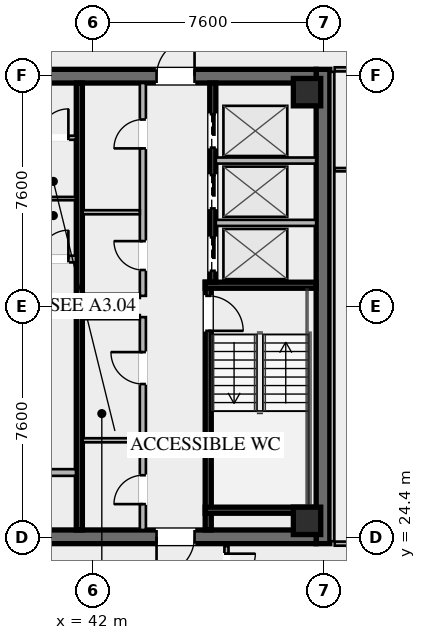
"""IFC4 building model, lengths in metres.
Left out: names, types, materials, properties, quantities, classifications, styles, units other than length and angle.
Written with IfcOpenShell. Run it as: python <this file> out.ifc"""

import sys

from ifc_helpers import new_model, si_unit, direction, frame, frame_2d, origin, origin_2d, place, context, subcontext, project, spatial, rectangle, hollow_rectangle, extrude, element, fill, save


model = new_model("IFC4")
c1 = context("Model", 3, precision=1e-05, world=origin(), true_north=direction((0.0, 1.0)))
c2 = subcontext(c1, "Body", "Model", "MODEL_VIEW")
j1 = project(units=[si_unit("LENGTHUNIT", "METRE"), si_unit("PLANEANGLEUNIT", "RADIAN")], contexts=[c1])
p1 = place(None, origin())
s1 = spatial("IfcSite", under=j1, at=p1, CompositionType="ELEMENT")
p2 = place(p1, origin())
s2 = spatial("IfcBuilding", under=s1, at=p2, CompositionType="ELEMENT")
p3 = place(p2, frame((0.0, 0.0, 232.6)))
s3 = spatial("IfcBuildingStorey", under=s2, at=p3, CompositionType="ELEMENT", Elevation=232.6)
p4 = place(p3, frame((49.575, 39.8, 0.0), z_axis=(0.0, 0.0, 1.0), x_axis=(0.0, -1.0, 0.0)))
e1 = element("IfcWall", 1, at=p4, inside=s3, PredefinedType="SHEAR", context=c2, shape_type="SweptSolid", body=[
    extrude(rectangle(XDim=15.6, YDim=0.45, at=frame_2d((7.8, 0.0))), origin(), (0.0, 0.0, 1.0), 3.55),
])
p5 = place(p3, frame((49.35, 24.425, 0.0), z_axis=(0.0, 0.0, 1.0), x_axis=(-1.0, 0.0, 0.0)))
e2 = element("IfcWall", 2, at=p5, inside=s3, PredefinedType="SHEAR", context=c2, shape_type="SweptSolid", body=[
    extrude(rectangle(XDim=14.7, YDim=0.45, at=frame_2d((7.35, 0.0))), origin(), (0.0, 0.0, 1.0), 3.55),
])
p6 = place(p5, frame((9.05, 0.0, 0.0)))
e3 = element("IfcOpeningElement", 3, at=p6, cuts=e2, PredefinedType="OPENING", context=c2, shape_type="SweptSolid", body=[
    extrude(rectangle(XDim=1.25, YDim=2.25, at=frame_2d((0.625, 1.125))), frame((0.0, 0.235, 0.0), z_axis=(0.0, -1.0, 0.0), x_axis=(1.0, 0.0, 0.0)), (0.0, 0.0, 1.0), 0.47),
])
p7 = place(p5, frame((4.0, 0.0, 0.0)))
e4 = element("IfcOpeningElement", 4, at=p7, cuts=e2, PredefinedType="OPENING", context=c2, shape_type="SweptSolid", body=[
    extrude(rectangle(XDim=1.25, YDim=2.25, at=frame_2d((0.625, 1.125))), frame((0.0, 0.235, 0.0), z_axis=(0.0, -1.0, 0.0), x_axis=(1.0, 0.0, 0.0)), (0.0, 0.0, 1.0), 0.47),
])
p8 = place(p3, frame((34.65, 39.575, 0.0), z_axis=(0.0, 0.0, 1.0), x_axis=(1.0, 0.0, 0.0)))
e5 = element("IfcWall", 5, at=p8, inside=s3, PredefinedType="SHEAR", context=c2, shape_type="SweptSolid", body=[
    extrude(rectangle(XDim=14.7, YDim=0.45, at=frame_2d((7.35, 0.0))), origin(), (0.0, 0.0, 1.0), 3.55),
])
p9 = place(p8, frame((4.4, 0.0, 0.0)))
e6 = element("IfcOpeningElement", 6, at=p9, cuts=e5, PredefinedType="OPENING", context=c2, shape_type="SweptSolid", body=[
    extrude(rectangle(XDim=1.25, YDim=2.25, at=frame_2d((0.625, 1.125))), frame((0.0, 0.235, 0.0), z_axis=(0.0, -1.0, 0.0), x_axis=(1.0, 0.0, 0.0)), (0.0, 0.0, 1.0), 0.47),
])
p10 = place(p8, frame((9.45, 0.0, 0.0)))
e7 = element("IfcOpeningElement", 7, at=p10, cuts=e5, PredefinedType="OPENING", context=c2, shape_type="SweptSolid", body=[
    extrude(rectangle(XDim=1.25, YDim=2.25, at=frame_2d((0.625, 1.125))), frame((0.0, 0.235, 0.0), z_axis=(0.0, -1.0, 0.0), x_axis=(1.0, 0.0, 0.0)), (0.0, 0.0, 1.0), 0.47),
])
for number, where, z_axis, x_axis in (
    (8, (49.05, 24.95, 0.0), (0.0, 0.0, 1.0), (1.0, 0.0, 0.0)),
    (9, (49.05, 39.05, 0.0), (0.0, 0.0, 1.0), (1.0, 0.0, 0.0)),
):
    element("IfcColumn", number, at=place(p3, frame(where, z_axis=z_axis, x_axis=x_axis)), inside=s3, PredefinedType="COLUMN", context=c2, shape_type="SweptSolid", body=[
        extrude(hollow_rectangle(XDim=0.9, YDim=0.9, WallThickness=0.04, at=origin_2d()), origin(), (0.0, 0.0, 1.0), 3.37),
    ])
p11 = place(p3, frame((45.8, 32.8, 0.0), z_axis=(0.0, 0.0, 1.0), x_axis=(0.0, -1.0, 0.0)))
e10 = element("IfcWall", 10, at=p11, inside=s3, PredefinedType="SHEAR", context=c2, shape_type="SweptSolid", body=[
    extrude(rectangle(XDim=8.15, YDim=0.2, at=frame_2d((4.075, 0.0))), origin(), (0.0, 0.0, 1.0), 3.37),
])
p12 = place(p11, frame((0.45, 0.0, 0.0)))
e11 = element("IfcOpeningElement", 11, at=p12, cuts=e10, PredefinedType="OPENING", context=c2, shape_type="SweptSolid", body=[
    extrude(rectangle(XDim=1.15, YDim=2.2, at=frame_2d((0.575, 1.1))), frame((0.0, 0.11, 0.0), z_axis=(0.0, -1.0, 0.0), x_axis=(1.0, 0.0, 0.0)), (0.0, 0.0, 1.0), 0.22),
])
for number, where, z_axis, x_axis in (
    (12, (45.7, 32.7, 0.0), (0.0, 0.0, 1.0), (1.0, 0.0, 0.0)),
    (13, (45.7, 25.3, 0.0), (0.0, 0.0, 1.0), (1.0, 0.0, 0.0)),
):
    element("IfcWall", number, at=place(p3, frame(where, z_axis=z_axis, x_axis=x_axis)), inside=s3, PredefinedType="SHEAR", context=c2, shape_type="SweptSolid", body=[
        extrude(rectangle(XDim=3.65, YDim=0.2, at=frame_2d((1.825, 0.0))), origin(), (0.0, 0.0, 1.0), 3.37),
    ])
p13 = place(p3, frame((41.56, 24.65, 0.0), z_axis=(0.0, 0.0, 1.0), x_axis=(0.0, 1.0, 0.0)))
e14 = element("IfcWall", 14, at=p13, inside=s3, PredefinedType="SHEAR", context=c2, shape_type="SweptSolid", body=[
    extrude(rectangle(XDim=14.7, YDim=0.2, at=frame_2d((7.35, 0.0))), origin(), (0.0, 0.0, 1.0), 3.37),
])
p14 = place(p3, frame((38.3, 33.56, 0.0), z_axis=(0.0, 0.0, 1.0), x_axis=(1.0, 0.0, 0.0)))
e15 = element("IfcWall", 15, at=p14, inside=s3, PredefinedType="SOLIDWALL", context=c2, shape_type="SweptSolid", body=[
    extrude(rectangle(XDim=3.15, YDim=0.22, at=frame_2d((1.575, 0.0))), origin(), (0.0, 0.0, 1.0), 2.723),
])
p15 = place(p14, frame((0.25, 0.0, 0.0)))
e16 = element("IfcOpeningElement", 16, at=p15, cuts=e15, PredefinedType="OPENING", context=c2, shape_type="SweptSolid", body=[
    extrude(rectangle(XDim=0.95, YDim=2.05, at=frame_2d((0.475, 1.025))), frame((0.0, 0.12, 0.0), z_axis=(0.0, -1.0, 0.0), x_axis=(1.0, 0.0, 0.0)), (0.0, 0.0, 1.0), 0.24),
])
p16 = place(p14, frame((1.95, 0.0, 0.0)))
e17 = element("IfcOpeningElement", 17, at=p16, cuts=e15, PredefinedType="OPENING", context=c2, shape_type="SweptSolid", body=[
    extrude(rectangle(XDim=0.95, YDim=2.05, at=frame_2d((0.475, 1.025))), frame((0.0, 0.12, 0.0), z_axis=(0.0, -1.0, 0.0), x_axis=(1.0, 0.0, 0.0)), (0.0, 0.0, 1.0), 0.24),
])
p17 = place(p3, frame((38.3, 26.54, 0.0), z_axis=(0.0, 0.0, 1.0), x_axis=(1.0, 0.0, 0.0)))
e18 = element("IfcWall", 18, at=p17, inside=s3, PredefinedType="SOLIDWALL", context=c2, shape_type="SweptSolid", body=[
    extrude(rectangle(XDim=3.15, YDim=0.22, at=frame_2d((1.575, 0.0))), origin(), (0.0, 0.0, 1.0), 2.723),
])
p18 = place(p17, frame((0.95, 0.0, 0.0)))
e19 = element("IfcOpeningElement", 19, at=p18, cuts=e18, PredefinedType="OPENING", context=c2, shape_type="SweptSolid", body=[
    extrude(rectangle(XDim=1.25, YDim=2.25, at=frame_2d((0.625, 1.125))), frame((0.0, 0.12, 0.0), z_axis=(0.0, -1.0, 0.0), x_axis=(1.0, 0.0, 0.0)), (0.0, 0.0, 1.0), 0.24),
])
p19 = place(p3, frame((45.95, 39.35, 0.0), z_axis=(0.0, 0.0, 1.0), x_axis=(0.0, -1.0, 0.0)))
e20 = element("IfcWall", 20, at=p19, inside=s3, PredefinedType="SHEAR", context=c2, shape_type="SweptSolid", body=[
    extrude(rectangle(XDim=6.55, YDim=0.2, at=frame_2d((3.275, 0.0))), origin(), (0.0, 0.0, 1.0), 3.37),
])
p20 = place(p19, frame((5.075, 0.0, 0.0)))
e21 = element("IfcOpeningElement", 21, at=p20, cuts=e20, PredefinedType="OPENING", context=c2, shape_type="SweptSolid", body=[
    extrude(rectangle(XDim=1.1, YDim=2.2, at=frame_2d((0.55, 1.1))), frame((0.0, 0.11, 0.0), z_axis=(0.0, -1.0, 0.0), x_axis=(1.0, 0.0, 0.0)), (0.0, 0.0, 1.0), 0.22),
])
p21 = place(p19, frame((3.025, 0.0, 0.0)))
e22 = element("IfcOpeningElement", 22, at=p21, cuts=e20, PredefinedType="OPENING", context=c2, shape_type="SweptSolid", body=[
    extrude(rectangle(XDim=1.1, YDim=2.2, at=frame_2d((0.55, 1.1))), frame((0.0, 0.11, 0.0), z_axis=(0.0, -1.0, 0.0), x_axis=(1.0, 0.0, 0.0)), (0.0, 0.0, 1.0), 0.22),
])
p22 = place(p19, frame((1.025, 0.0, 0.0)))
e23 = element("IfcOpeningElement", 23, at=p22, cuts=e20, PredefinedType="OPENING", context=c2, shape_type="SweptSolid", body=[
    extrude(rectangle(XDim=1.1, YDim=2.2, at=frame_2d((0.55, 1.1))), frame((0.0, 0.11, 0.0), z_axis=(0.0, -1.0, 0.0), x_axis=(1.0, 0.0, 0.0)), (0.0, 0.0, 1.0), 0.22),
])
for number, where, z_axis, x_axis in (
    (24, (46.05, 34.75, 0.0), (0.0, 0.0, 1.0), (1.0, 0.0, 0.0)),
    (25, (46.05, 36.8, 0.0), (0.0, 0.0, 1.0), (1.0, 0.0, 0.0)),
):
    element("IfcWall", number, at=place(p3, frame(where, z_axis=z_axis, x_axis=x_axis)), inside=s3, PredefinedType="SOLIDWALL", context=c2, shape_type="SweptSolid", body=[
        extrude(rectangle(XDim=3.3, YDim=0.2, at=frame_2d((1.65, 0.0))), origin(), (0.0, 0.0, 1.0), 3.37),
    ])
p23 = place(p3, frame((38.3, 37.55, 0.0), z_axis=(0.0, 0.0, 1.0), x_axis=(1.0, 0.0, 0.0)))
e26 = element("IfcWall", 26, at=p23, inside=s3, PredefinedType="PARTITIONING", context=c2, shape_type="SweptSolid", body=[
    extrude(rectangle(XDim=3.15, YDim=0.135, at=frame_2d((1.575, 0.0))), origin(), (0.0, 0.0, 1.0), 2.723),
])
p24 = place(p23, frame((0.25, 0.0, 0.0)))
e27 = element("IfcOpeningElement", 27, at=p24, cuts=e26, PredefinedType="OPENING", context=c2, shape_type="SweptSolid", body=[
    extrude(rectangle(XDim=0.95, YDim=2.05, at=frame_2d((0.475, 1.025))), frame((0.0, 0.077, 0.0), z_axis=(0.0, -1.0, 0.0), x_axis=(1.0, 0.0, 0.0)), (0.0, 0.0, 1.0), 0.155),
])
p25 = place(p23, frame((1.95, 0.0, 0.0)))
e28 = element("IfcOpeningElement", 28, at=p25, cuts=e26, PredefinedType="OPENING", context=c2, shape_type="SweptSolid", body=[
    extrude(rectangle(XDim=0.95, YDim=2.05, at=frame_2d((0.475, 1.025))), frame((0.0, 0.077, 0.0), z_axis=(0.0, -1.0, 0.0), x_axis=(1.0, 0.0, 0.0)), (0.0, 0.0, 1.0), 0.155),
])
p26 = place(p3, frame((38.3, 35.55, 0.0), z_axis=(0.0, 0.0, 1.0), x_axis=(1.0, 0.0, 0.0)))
e29 = element("IfcWall", 29, at=p26, inside=s3, PredefinedType="PARTITIONING", context=c2, shape_type="SweptSolid", body=[
    extrude(rectangle(XDim=3.15, YDim=0.11, at=frame_2d((1.575, 0.0))), origin(), (0.0, 0.0, 1.0), 2.723),
])
p27 = place(p3, frame((43.65, 24.65, 0.0), z_axis=(0.0, 0.0, 1.0), x_axis=(0.0, 1.0, 0.0)))
e30 = element("IfcWall", 30, at=p27, inside=s3, PredefinedType="SOLIDWALL", context=c2, shape_type="SweptSolid", body=[
    extrude(rectangle(XDim=7.0, YDim=0.2, at=frame_2d((3.5, 0.0))), origin(), (0.0, 0.0, 1.0), 2.723),
])
p28 = place(p27, frame((0.85, 0.0, 0.0)))
e31 = element("IfcOpeningElement", 31, at=p28, cuts=e30, PredefinedType="OPENING", context=c2, shape_type="SweptSolid", body=[
    extrude(rectangle(XDim=0.95, YDim=2.05, at=frame_2d((0.475, 1.025))), frame((0.0, 0.11, 0.0), z_axis=(0.0, -1.0, 0.0), x_axis=(1.0, 0.0, 0.0)), (0.0, 0.0, 1.0), 0.22),
])
p29 = place(p27, frame((4.8, 0.0, 0.0)))
e32 = element("IfcOpeningElement", 32, at=p29, cuts=e30, PredefinedType="OPENING", context=c2, shape_type="SweptSolid", body=[
    extrude(rectangle(XDim=1.05, YDim=2.2, at=frame_2d((0.525, 1.1))), frame((0.0, 0.11, 0.0), z_axis=(0.0, -1.0, 0.0), x_axis=(1.0, 0.0, 0.0)), (0.0, 0.0, 1.0), 0.22),
])
for number, where, z_axis, x_axis in (
    (33, (41.67, 31.65, 0.0), (0.0, 0.0, 1.0), (1.0, 0.0, 0.0)),
    (34, (41.67, 27.6, 0.0), (0.0, 0.0, 1.0), (1.0, 0.0, 0.0)),
):
    element("IfcWall", number, at=place(p3, frame(where, z_axis=z_axis, x_axis=x_axis)), inside=s3, PredefinedType="PARTITIONING", context=c2, shape_type="SweptSolid", body=[
        extrude(rectangle(XDim=1.88, YDim=0.135, at=frame_2d((0.94, 0.0))), origin(), (0.0, 0.0, 1.0), 2.723),
    ])
p30 = place(p3, frame((43.65, 32.35, 0.0), z_axis=(0.0, 0.0, 1.0), x_axis=(0.0, 1.0, 0.0)))
e35 = element("IfcWall", 35, at=p30, inside=s3, PredefinedType="SOLIDWALL", context=c2, shape_type="SweptSolid", body=[
    extrude(rectangle(XDim=7.0, YDim=0.2, at=frame_2d((3.5, 0.0))), origin(), (0.0, 0.0, 1.0), 2.723),
])
p31 = place(p30, frame((0.85, 0.0, 0.0)))
e36 = element("IfcOpeningElement", 36, at=p31, cuts=e35, PredefinedType="OPENING", context=c2, shape_type="SweptSolid", body=[
    extrude(rectangle(XDim=0.95, YDim=2.05, at=frame_2d((0.475, 1.025))), frame((0.0, 0.11, 0.0), z_axis=(0.0, -1.0, 0.0), x_axis=(1.0, 0.0, 0.0)), (0.0, 0.0, 1.0), 0.22),
])
p32 = place(p30, frame((4.85, 0.0, 0.0)))
e37 = element("IfcOpeningElement", 37, at=p32, cuts=e35, PredefinedType="OPENING", context=c2, shape_type="SweptSolid", body=[
    extrude(rectangle(XDim=0.95, YDim=2.05, at=frame_2d((0.475, 1.025))), frame((0.0, 0.11, 0.0), z_axis=(0.0, -1.0, 0.0), x_axis=(1.0, 0.0, 0.0)), (0.0, 0.0, 1.0), 0.22),
])
for number, where, z_axis, x_axis in (
    (38, (41.67, 32.35, 0.0), (0.0, 0.0, 1.0), (1.0, 0.0, 0.0)),
    (39, (41.67, 35.1, 0.0), (0.0, 0.0, 1.0), (1.0, 0.0, 0.0)),
):
    element("IfcWall", number, at=place(p3, frame(where, z_axis=z_axis, x_axis=x_axis)), inside=s3, PredefinedType="PARTITIONING", context=c2, shape_type="SweptSolid", body=[
        extrude(rectangle(XDim=1.88, YDim=0.135, at=frame_2d((0.94, 0.0))), origin(), (0.0, 0.0, 1.0), 2.723),
    ])
p33 = place(p3, frame((46.4, 24.12, 0.0), z_axis=(0.0, 0.0, 1.0), x_axis=(0.0, -1.0, 0.0)))
e40 = element("IfcWall", 40, at=p33, inside=s3, PredefinedType="PARTITIONING", context=c2, shape_type="SweptSolid", body=[
    extrude(rectangle(XDim=2.54, YDim=0.135, at=frame_2d((1.27, 0.0))), origin(), (0.0, 0.0, 1.0), 2.723),
])
p34 = place(p33, frame((0.25, 0.0, 0.0)))
e41 = element("IfcOpeningElement", 41, at=p34, cuts=e40, PredefinedType="OPENING", context=c2, shape_type="SweptSolid", body=[
    extrude(rectangle(XDim=0.95, YDim=2.05, at=frame_2d((0.475, 1.025))), frame((0.0, 0.077, 0.0), z_axis=(0.0, -1.0, 0.0), x_axis=(1.0, 0.0, 0.0)), (0.0, 0.0, 1.0), 0.155),
])
p35 = place(p3, frame((49.88, 39.72, 0.0), z_axis=(0.0, 0.0, 1.0), x_axis=(0.0, -1.0, 0.0)))
e42 = element("IfcWall", 42, at=p35, inside=s3, PredefinedType="PARTITIONING", context=c2, shape_type="SweptSolid", body=[
    extrude(rectangle(XDim=15.44, YDim=0.135, at=frame_2d((7.72, 0.0))), origin(), (0.0, 0.0, 1.0), 2.723),
])
p36 = place(p3, frame((57.53, 39.8, 0.0), z_axis=(0.0, 0.0, 1.0), x_axis=(-1.0, 0.0, 0.0)))
e43 = element("IfcWall", 43, at=p36, inside=s3, PredefinedType="PARTITIONING", context=c2, shape_type="SweptSolid", body=[
    extrude(rectangle(XDim=7.57, YDim=0.135, at=frame_2d((3.785, 0.0))), origin(), (0.0, 0.0, 1.0), 2.723),
])
p37 = place(p36, frame((6.13, 0.0, 0.0)))
e44 = element("IfcOpeningElement", 44, at=p37, cuts=e43, PredefinedType="OPENING", context=c2, shape_type="SweptSolid", body=[
    extrude(rectangle(XDim=0.95, YDim=2.05, at=frame_2d((0.475, 1.025))), frame((0.0, 0.077, 0.0), z_axis=(0.0, -1.0, 0.0), x_axis=(1.0, 0.0, 0.0)), (0.0, 0.0, 1.0), 0.155),
])
p38 = place(p3, frame((49.96, 24.2, 0.0), z_axis=(0.0, 0.0, 1.0), x_axis=(1.0, 0.0, 0.0)))
e45 = element("IfcWall", 45, at=p38, inside=s3, PredefinedType="PARTITIONING", context=c2, shape_type="SweptSolid", body=[
    extrude(rectangle(XDim=7.57, YDim=0.135, at=frame_2d((3.785, 0.0))), origin(), (0.0, 0.0, 1.0), 2.723),
])
p39 = place(p3, frame((49.96, 36.5, 0.0), z_axis=(0.0, 0.0, 1.0), x_axis=(1.0, 0.0, 0.0)))
e46 = element("IfcWall", 46, at=p39, inside=s3, PredefinedType="PARTITIONING", context=c2, shape_type="SweptSolid", body=[
    extrude(rectangle(XDim=7.57, YDim=0.11, at=frame_2d((3.785, 0.0))), origin(), (0.0, 0.0, 1.0), 2.723),
])
p40 = place(p39, frame((1.8, 0.0, 0.0)))
e47 = element("IfcOpeningElement", 47, at=p40, cuts=e46, PredefinedType="OPENING", context=c2, shape_type="SweptSolid", body=[
    extrude(rectangle(XDim=0.95, YDim=2.05, at=frame_2d((0.475, 1.025))), frame((0.0, 0.065, 0.0), z_axis=(0.0, -1.0, 0.0), x_axis=(1.0, 0.0, 0.0)), (0.0, 0.0, 1.0), 0.13),
])
p41 = place(p10, origin())
e48 = element("IfcDoor", 48, at=p41, inside=s3, OperationType="SINGLE_SWING_RIGHT", PredefinedType="DOOR", context=c2, shape_type="SweptSolid", body=[
    extrude(rectangle(XDim=1.25, YDim=2.25, at=frame_2d((0.625, 1.125))), frame((0.0, 0.025, 0.0), z_axis=(0.0, -1.0, 0.0), x_axis=(1.0, 0.0, 0.0)), (0.0, 0.0, 1.0), 0.05),
])
fill(e7, e48)
p42 = place(p7, origin())
e49 = element("IfcDoor", 49, at=p42, inside=s3, OperationType="SINGLE_SWING_RIGHT", PredefinedType="DOOR", context=c2, shape_type="SweptSolid", body=[
    extrude(rectangle(XDim=1.25, YDim=2.25, at=frame_2d((0.625, 1.125))), frame((0.0, 0.025, 0.0), z_axis=(0.0, -1.0, 0.0), x_axis=(1.0, 0.0, 0.0)), (0.0, 0.0, 1.0), 0.05),
])
fill(e4, e49)
p43 = place(p12, origin())
e50 = element("IfcDoor", 50, at=p43, inside=s3, OperationType="SINGLE_SWING_RIGHT", PredefinedType="DOOR", context=c2, shape_type="SweptSolid", body=[
    extrude(rectangle(XDim=1.15, YDim=2.2, at=frame_2d((0.575, 1.1))), frame((0.0, 0.025, 0.0), z_axis=(0.0, -1.0, 0.0), x_axis=(1.0, 0.0, 0.0)), (0.0, 0.0, 1.0), 0.05),
])
fill(e11, e50)
p44 = place(p25, origin())
e51 = element("IfcDoor", 51, at=p44, inside=s3, OperationType="SINGLE_SWING_RIGHT", PredefinedType="DOOR", context=c2, shape_type="SweptSolid", body=[
    extrude(rectangle(XDim=0.95, YDim=2.05, at=frame_2d((0.475, 1.025))), frame((0.0, 0.025, 0.0), z_axis=(0.0, -1.0, 0.0), x_axis=(1.0, 0.0, 0.0)), (0.0, 0.0, 1.0), 0.05),
])
fill(e28, e51)
p45 = place(p16, origin())
e52 = element("IfcDoor", 52, at=p45, inside=s3, OperationType="SINGLE_SWING_RIGHT", PredefinedType="DOOR", context=c2, shape_type="SweptSolid", body=[
    extrude(rectangle(XDim=0.95, YDim=2.05, at=frame_2d((0.475, 1.025))), frame((0.0, 0.025, 0.0), z_axis=(0.0, -1.0, 0.0), x_axis=(1.0, 0.0, 0.0)), (0.0, 0.0, 1.0), 0.05),
])
fill(e17, e52)
p46 = place(p28, origin())
e53 = element("IfcDoor", 53, at=p46, inside=s3, OperationType="SINGLE_SWING_LEFT", PredefinedType="DOOR", context=c2, shape_type="SweptSolid", body=[
    extrude(rectangle(XDim=0.95, YDim=2.05, at=frame_2d((0.475, 1.025))), frame((0.0, 0.025, 0.0), z_axis=(0.0, -1.0, 0.0), x_axis=(1.0, 0.0, 0.0)), (0.0, 0.0, 1.0), 0.05),
])
fill(e31, e53)
p47 = place(p29, origin())
e54 = element("IfcDoor", 54, at=p47, inside=s3, OperationType="SINGLE_SWING_RIGHT", PredefinedType="DOOR", context=c2, shape_type="SweptSolid", body=[
    extrude(rectangle(XDim=1.05, YDim=2.2, at=frame_2d((0.525, 1.1))), frame((0.0, 0.025, 0.0), z_axis=(0.0, -1.0, 0.0), x_axis=(1.0, 0.0, 0.0)), (0.0, 0.0, 1.0), 0.05),
])
fill(e32, e54)
p48 = place(p31, origin())
e55 = element("IfcDoor", 55, at=p48, inside=s3, OperationType="SINGLE_SWING_RIGHT", PredefinedType="DOOR", context=c2, shape_type="SweptSolid", body=[
    extrude(rectangle(XDim=0.95, YDim=2.05, at=frame_2d((0.475, 1.025))), frame((0.0, 0.025, 0.0), z_axis=(0.0, -1.0, 0.0), x_axis=(1.0, 0.0, 0.0)), (0.0, 0.0, 1.0), 0.05),
])
fill(e36, e55)
p49 = place(p32, origin())
e56 = element("IfcDoor", 56, at=p49, inside=s3, OperationType="SINGLE_SWING_LEFT", PredefinedType="DOOR", context=c2, shape_type="SweptSolid", body=[
    extrude(rectangle(XDim=0.95, YDim=2.05, at=frame_2d((0.475, 1.025))), frame((0.0, 0.025, 0.0), z_axis=(0.0, -1.0, 0.0), x_axis=(1.0, 0.0, 0.0)), (0.0, 0.0, 1.0), 0.05),
])
fill(e37, e56)
p50 = place(p34, origin())
e57 = element("IfcDoor", 57, at=p50, inside=s3, OperationType="SINGLE_SWING_LEFT", PredefinedType="DOOR", context=c2, shape_type="SweptSolid", body=[
    extrude(rectangle(XDim=0.95, YDim=2.05, at=frame_2d((0.475, 1.025))), frame((0.0, 0.025, 0.0), z_axis=(0.0, -1.0, 0.0), x_axis=(1.0, 0.0, 0.0)), (0.0, 0.0, 1.0), 0.05),
])
fill(e41, e57)
p51 = place(p20, origin())
e58 = element("IfcDoor", 58, at=p51, inside=s3, OperationType="SLIDING_TO_LEFT", PredefinedType="DOOR", context=c2, shape_type="SweptSolid", body=[
    extrude(rectangle(XDim=1.1, YDim=2.2, at=frame_2d((0.55, 1.1))), frame((0.0, 0.025, 0.0), z_axis=(0.0, -1.0, 0.0), x_axis=(1.0, 0.0, 0.0)), (0.0, 0.0, 1.0), 0.05),
])
fill(e21, e58)
p52 = place(p21, origin())
e59 = element("IfcDoor", 59, at=p52, inside=s3, OperationType="SLIDING_TO_LEFT", PredefinedType="DOOR", context=c2, shape_type="SweptSolid", body=[
    extrude(rectangle(XDim=1.1, YDim=2.2, at=frame_2d((0.55, 1.1))), frame((0.0, 0.025, 0.0), z_axis=(0.0, -1.0, 0.0), x_axis=(1.0, 0.0, 0.0)), (0.0, 0.0, 1.0), 0.05),
])
fill(e22, e59)
p53 = place(p22, origin())
e60 = element("IfcDoor", 60, at=p53, inside=s3, OperationType="SLIDING_TO_LEFT", PredefinedType="DOOR", context=c2, shape_type="SweptSolid", body=[
    extrude(rectangle(XDim=1.1, YDim=2.2, at=frame_2d((0.55, 1.1))), frame((0.0, 0.025, 0.0), z_axis=(0.0, -1.0, 0.0), x_axis=(1.0, 0.0, 0.0)), (0.0, 0.0, 1.0), 0.05),
])
fill(e23, e60)
save(model, sys.argv[1])
